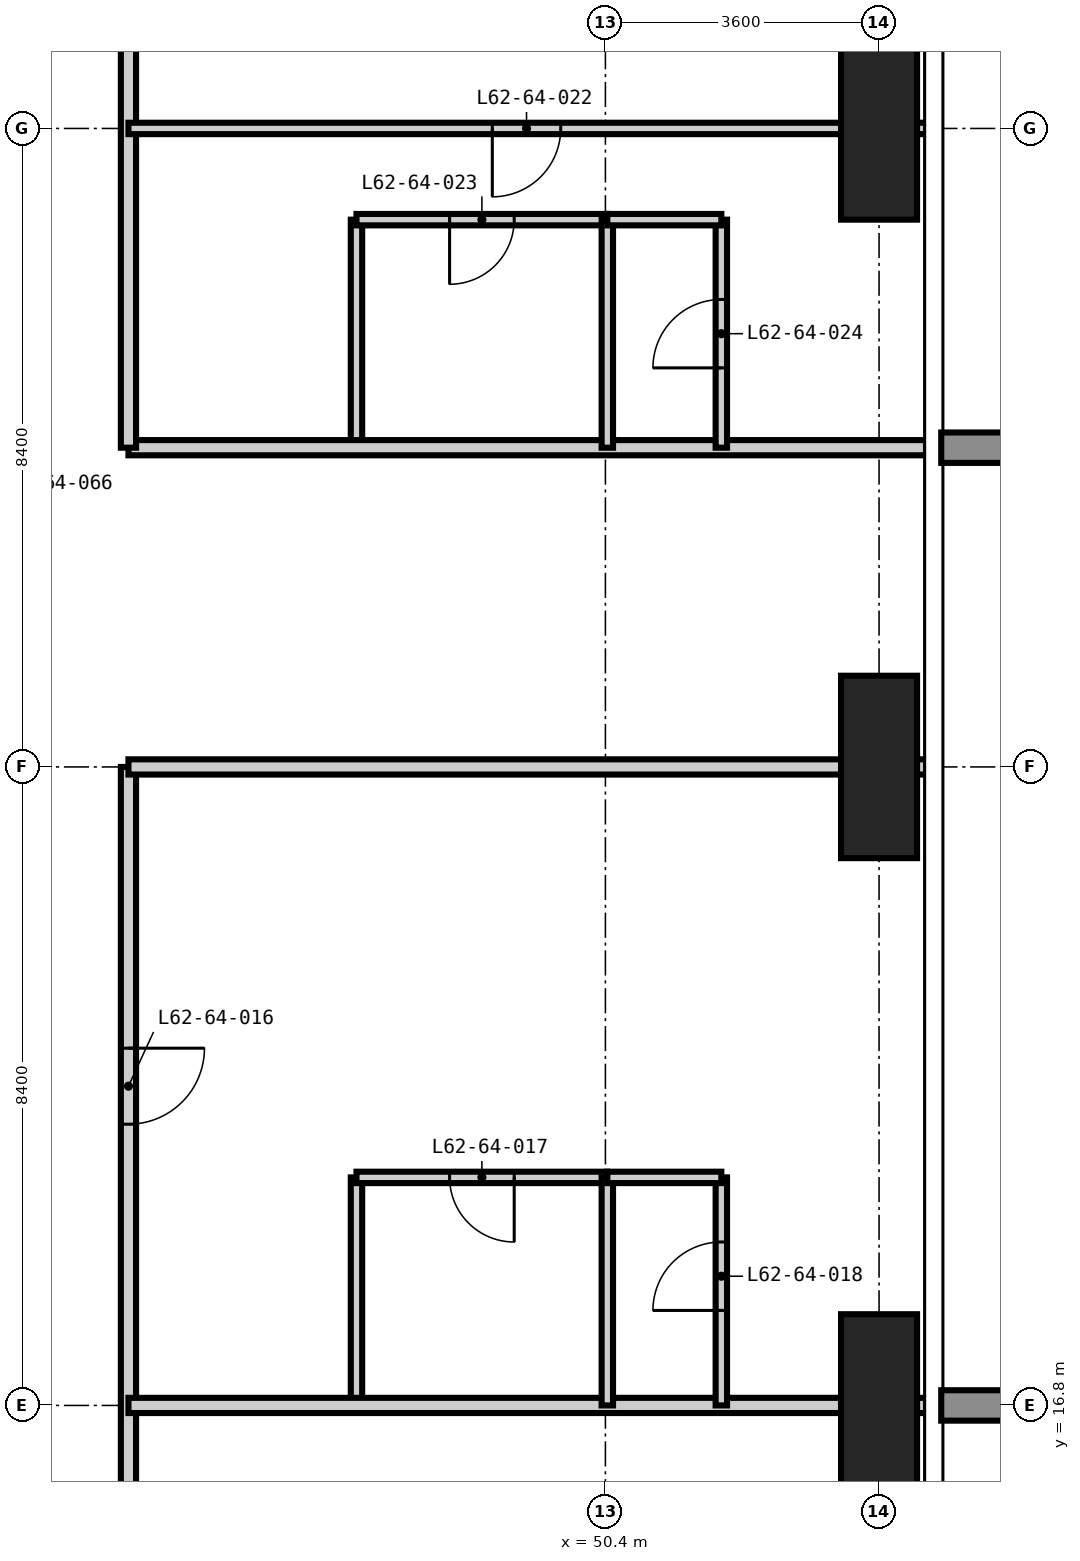
"""IFC4 building model, lengths in metres.
Left out: names, types, materials, properties, quantities, classifications, styles, units other than length and angle.
Written with IfcOpenShell. Run it as: python <this file> out.ifc"""

import sys

from ifc_helpers import new_model, si_unit, direction, frame, frame_2d, origin, origin_2d, place, context, subcontext, project, spatial, rectangle, extrude, element, fill, save


model = new_model("IFC4")
c1 = context("Model", 3, precision=1e-05, world=origin(), true_north=direction((0.0, 1.0)))
c2 = subcontext(c1, "Body", "Model", "MODEL_VIEW")
j1 = project(units=[si_unit("LENGTHUNIT", "METRE"), si_unit("PLANEANGLEUNIT", "RADIAN")], contexts=[c1])
p1 = place(None, origin())
s1 = spatial("IfcSite", under=j1, at=p1, CompositionType="ELEMENT")
p2 = place(p1, origin())
s2 = spatial("IfcBuilding", under=s1, at=p2, CompositionType="ELEMENT")
p3 = place(p2, frame((0.0, 0.0, 241.2)))
s3 = spatial("IfcBuildingStorey", under=s2, at=p3, CompositionType="ELEMENT", Elevation=241.2)
for number, where, z_axis, x_axis in (
    (1, (54.0, 16.8, -0.35), (0.0, 0.0, 1.0), (1.0, 0.0, 0.0)),
    (2, (54.0, 25.2, -0.35), (0.0, 0.0, 1.0), (1.0, 0.0, 0.0)),
    (3, (54.0, 33.6, -0.35), (0.0, 0.0, 1.0), (1.0, 0.0, 0.0)),
):
    element("IfcColumn", number, at=place(p3, frame(where, z_axis=z_axis, x_axis=x_axis)), inside=s3, PredefinedType="COLUMN", context=c2, shape_type="SweptSolid", body=[
        extrude(rectangle(XDim=1.0, YDim=2.4, at=origin_2d()), origin(), (0.0, 0.0, 1.0), 3.9),
    ])
for number, where, z_axis, x_axis in (
    (4, (47.125, 16.8, 0.0), (0.0, 0.0, 1.0), (0.0, 1.0, 0.0)),
    (5, (47.125, 29.4, 0.0), (0.0, 0.0, 1.0), (0.0, 1.0, 0.0)),
):
    element("IfcWall", number, at=place(p3, frame(where, z_axis=z_axis, x_axis=x_axis)), inside=s3, PredefinedType="PARTITIONING", context=c2, shape_type="SweptSolid", body=[
        extrude(rectangle(XDim=3.0, YDim=0.15, at=frame_2d((1.5, 0.0))), origin(), (0.0, 0.0, 1.0), 3.55),
    ])
p4 = place(p3, frame((47.125, 19.8, 0.0), z_axis=(0.0, 0.0, 1.0), x_axis=(1.0, 0.0, 0.0)))
e6 = element("IfcWall", 6, at=p4, inside=s3, PredefinedType="PARTITIONING", context=c2, shape_type="SweptSolid", body=[
    extrude(rectangle(XDim=3.3, YDim=0.15, at=frame_2d((1.65, 0.0))), origin(), (0.0, 0.0, 1.0), 3.55),
])
p5 = place(p4, frame((1.225, 0.0, 0.0)))
e7 = element("IfcOpeningElement", 7, at=p5, cuts=e6, PredefinedType="OPENING", context=c2, shape_type="SweptSolid", body=[
    extrude(rectangle(XDim=0.85, YDim=2.1, at=frame_2d((0.425, 1.05))), frame((0.0, 0.085, 0.0), z_axis=(0.0, -1.0, 0.0), x_axis=(1.0, 0.0, 0.0)), (0.0, 0.0, 1.0), 0.17),
])
p6 = place(p3, frame((47.125, 32.4, 0.0), z_axis=(0.0, 0.0, 1.0), x_axis=(1.0, 0.0, 0.0)))
e8 = element("IfcWall", 8, at=p6, inside=s3, PredefinedType="PARTITIONING", context=c2, shape_type="SweptSolid", body=[
    extrude(rectangle(XDim=3.3, YDim=0.15, at=frame_2d((1.65, 0.0))), origin(), (0.0, 0.0, 1.0), 3.55),
])
p7 = place(p6, frame((1.225, 0.0, 0.0)))
e9 = element("IfcOpeningElement", 9, at=p7, cuts=e8, PredefinedType="OPENING", context=c2, shape_type="SweptSolid", body=[
    extrude(rectangle(XDim=0.85, YDim=2.1, at=frame_2d((0.425, 1.05))), frame((0.0, 0.085, 0.0), z_axis=(0.0, -1.0, 0.0), x_axis=(1.0, 0.0, 0.0)), (0.0, 0.0, 1.0), 0.17),
])
p8 = place(p3, frame((44.125, 29.4, 0.0), z_axis=(0.0, 0.0, 1.0), x_axis=(1.0, 0.0, 0.0)))
e10 = element("IfcWall", 10, at=p8, inside=s3, PredefinedType="PARTITIONING", context=c2, shape_type="SweptSolid", body=[
    extrude(rectangle(XDim=10.493, YDim=0.2, at=frame_2d((5.247, 0.0))), origin(), (0.0, 0.0, 1.0), 3.55),
])
p9 = place(p3, frame((44.125, 25.2, 0.0), z_axis=(0.0, 0.0, 1.0), x_axis=(0.0, -1.0, 0.0)))
e11 = element("IfcWall", 11, at=p9, inside=s3, PredefinedType="PARTITIONING", context=c2, shape_type="SweptSolid", body=[
    extrude(rectangle(XDim=11.725, YDim=0.2, at=frame_2d((5.862, 0.0))), origin(), (0.0, 0.0, 1.0), 3.55),
])
p10 = place(p9, frame((3.7, 0.0, 0.0)))
e12 = element("IfcOpeningElement", 12, at=p10, cuts=e11, PredefinedType="OPENING", context=c2, shape_type="SweptSolid", body=[
    extrude(rectangle(XDim=1.0, YDim=2.2, at=frame_2d((0.5, 1.1))), frame((0.0, 0.11, 0.0), z_axis=(0.0, -1.0, 0.0), x_axis=(1.0, 0.0, 0.0)), (0.0, 0.0, 1.0), 0.22),
])
p11 = place(p9, frame((9.563, 0.0, 0.0)))
e13 = element("IfcOpeningElement", 13, at=p11, cuts=e11, PredefinedType="OPENING", context=c2, shape_type="SweptSolid", body=[
    extrude(rectangle(XDim=1.0, YDim=2.2, at=frame_2d((0.5, 1.1))), frame((0.0, 0.11, 0.0), z_axis=(0.0, -1.0, 0.0), x_axis=(1.0, 0.0, 0.0)), (0.0, 0.0, 1.0), 0.22),
])
p12 = place(p3, frame((44.125, 44.725, 0.0), z_axis=(0.0, 0.0, 1.0), x_axis=(0.0, -1.0, 0.0)))
e14 = element("IfcWall", 14, at=p12, inside=s3, PredefinedType="PARTITIONING", context=c2, shape_type="SweptSolid", body=[
    extrude(rectangle(XDim=15.325, YDim=0.2, at=frame_2d((7.663, 0.0))), origin(), (0.0, 0.0, 1.0), 3.55),
])
p13 = place(p12, frame((5.225, 0.0, 0.0)))
e15 = element("IfcOpeningElement", 15, at=p13, cuts=e14, PredefinedType="OPENING", context=c2, shape_type="SweptSolid", body=[
    extrude(rectangle(XDim=1.0, YDim=2.2, at=frame_2d((0.5, 1.1))), frame((0.0, 0.11, 0.0), z_axis=(0.0, -1.0, 0.0), x_axis=(1.0, 0.0, 0.0)), (0.0, 0.0, 1.0), 0.22),
])
p14 = place(p12, frame((0.863, 0.0, 0.0)))
e16 = element("IfcOpeningElement", 16, at=p14, cuts=e14, PredefinedType="OPENING", context=c2, shape_type="SweptSolid", body=[
    extrude(rectangle(XDim=1.0, YDim=2.2, at=frame_2d((0.5, 1.1))), frame((0.0, 0.11, 0.0), z_axis=(0.0, -1.0, 0.0), x_axis=(1.0, 0.0, 0.0)), (0.0, 0.0, 1.0), 0.22),
])
for number, where, z_axis, x_axis in (
    (17, (54.618, 25.2, 0.0), (0.0, 0.0, 1.0), (-1.0, 0.0, 0.0)),
    (18, (44.125, 16.8, 0.0), (0.0, 0.0, 1.0), (1.0, 0.0, 0.0)),
):
    element("IfcWall", number, at=place(p3, frame(where, z_axis=z_axis, x_axis=x_axis)), inside=s3, PredefinedType="PARTITIONING", context=c2, shape_type="SweptSolid", body=[
        extrude(rectangle(XDim=10.493, YDim=0.2, at=frame_2d((5.247, 0.0))), origin(), (0.0, 0.0, 1.0), 3.55),
    ])
for number, where, z_axis, x_axis in (
    (19, (50.425, 16.8, 0.0), (0.0, 0.0, 1.0), (0.0, 1.0, 0.0)),
    (20, (50.425, 29.4, 0.0), (0.0, 0.0, 1.0), (0.0, 1.0, 0.0)),
):
    element("IfcWall", number, at=place(p3, frame(where, z_axis=z_axis, x_axis=x_axis)), inside=s3, PredefinedType="PARTITIONING", context=c2, shape_type="SweptSolid", body=[
        extrude(rectangle(XDim=3.0, YDim=0.15, at=frame_2d((1.5, 0.0))), origin(), (0.0, 0.0, 1.0), 3.55),
    ])
p15 = place(p3, frame((51.925, 16.8, 0.0), z_axis=(0.0, 0.0, 1.0), x_axis=(0.0, 1.0, 0.0)))
e21 = element("IfcWall", 21, at=p15, inside=s3, PredefinedType="PARTITIONING", context=c2, shape_type="SweptSolid", body=[
    extrude(rectangle(XDim=3.0, YDim=0.15, at=frame_2d((1.5, 0.0))), origin(), (0.0, 0.0, 1.0), 3.55),
])
p16 = place(p15, frame((1.25, 0.0, 0.0)))
e22 = element("IfcOpeningElement", 22, at=p16, cuts=e21, PredefinedType="OPENING", context=c2, shape_type="SweptSolid", body=[
    extrude(rectangle(XDim=0.9, YDim=2.1, at=frame_2d((0.45, 1.05))), frame((0.0, 0.085, 0.0), z_axis=(0.0, -1.0, 0.0), x_axis=(1.0, 0.0, 0.0)), (0.0, 0.0, 1.0), 0.17),
])
p17 = place(p3, frame((51.925, 29.4, 0.0), z_axis=(0.0, 0.0, 1.0), x_axis=(0.0, 1.0, 0.0)))
e23 = element("IfcWall", 23, at=p17, inside=s3, PredefinedType="PARTITIONING", context=c2, shape_type="SweptSolid", body=[
    extrude(rectangle(XDim=3.0, YDim=0.15, at=frame_2d((1.5, 0.0))), origin(), (0.0, 0.0, 1.0), 3.55),
])
p18 = place(p17, frame((1.05, 0.0, 0.0)))
e24 = element("IfcOpeningElement", 24, at=p18, cuts=e23, PredefinedType="OPENING", context=c2, shape_type="SweptSolid", body=[
    extrude(rectangle(XDim=0.9, YDim=2.1, at=frame_2d((0.45, 1.05))), frame((0.0, 0.085, 0.0), z_axis=(0.0, -1.0, 0.0), x_axis=(1.0, 0.0, 0.0)), (0.0, 0.0, 1.0), 0.17),
])
for number, where, z_axis, x_axis in (
    (25, (50.425, 19.8, 0.0), (0.0, 0.0, 1.0), (1.0, 0.0, 0.0)),
    (26, (50.425, 32.4, 0.0), (0.0, 0.0, 1.0), (1.0, 0.0, 0.0)),
):
    element("IfcWall", number, at=place(p3, frame(where, z_axis=z_axis, x_axis=x_axis)), inside=s3, PredefinedType="PARTITIONING", context=c2, shape_type="SweptSolid", body=[
        extrude(rectangle(XDim=1.5, YDim=0.15, at=frame_2d((0.75, 0.0))), origin(), (0.0, 0.0, 1.0), 3.55),
    ])
p19 = place(p3, frame((44.125, 33.6, 0.0), z_axis=(0.0, 0.0, 1.0), x_axis=(1.0, 0.0, 0.0)))
e27 = element("IfcWall", 27, at=p19, inside=s3, PredefinedType="PARTITIONING", context=c2, shape_type="SweptSolid", body=[
    extrude(rectangle(XDim=10.493, YDim=0.15, at=frame_2d((5.247, 0.0))), origin(), (0.0, 0.0, 1.0), 3.55),
])
p20 = place(p19, frame((4.787, 0.0, 0.0)))
e28 = element("IfcOpeningElement", 28, at=p20, cuts=e27, PredefinedType="OPENING", context=c2, shape_type="SweptSolid", body=[
    extrude(rectangle(XDim=0.9, YDim=2.1, at=frame_2d((0.45, 1.05))), frame((0.0, 0.085, 0.0), z_axis=(0.0, -1.0, 0.0), x_axis=(1.0, 0.0, 0.0)), (0.0, 0.0, 1.0), 0.17),
])
p21 = place(p10, origin())
e29 = element("IfcDoor", 29, at=p21, inside=s3, OperationType="SINGLE_SWING_LEFT", PredefinedType="DOOR", context=c2, shape_type="SweptSolid", body=[
    extrude(rectangle(XDim=1.0, YDim=2.2, at=frame_2d((0.5, 1.1))), frame((0.0, 0.025, 0.0), z_axis=(0.0, -1.0, 0.0), x_axis=(1.0, 0.0, 0.0)), (0.0, 0.0, 1.0), 0.05),
])
fill(e12, e29)
p22 = place(p5, frame((0.85, 0.0, 0.0), z_axis=(0.0, 0.0, 1.0), x_axis=(-1.0, 0.0, 0.0)))
e30 = element("IfcDoor", 30, at=p22, inside=s3, OperationType="SINGLE_SWING_LEFT", PredefinedType="DOOR", context=c2, shape_type="SweptSolid", body=[
    extrude(rectangle(XDim=0.85, YDim=2.1, at=frame_2d((0.425, 1.05))), frame((0.0, 0.025, 0.0), z_axis=(0.0, -1.0, 0.0), x_axis=(1.0, 0.0, 0.0)), (0.0, 0.0, 1.0), 0.05),
])
fill(e7, e30)
p23 = place(p16, origin())
e31 = element("IfcDoor", 31, at=p23, inside=s3, OperationType="SINGLE_SWING_LEFT", PredefinedType="DOOR", context=c2, shape_type="SweptSolid", body=[
    extrude(rectangle(XDim=0.9, YDim=2.1, at=frame_2d((0.45, 1.05))), frame((0.0, 0.025, 0.0), z_axis=(0.0, -1.0, 0.0), x_axis=(1.0, 0.0, 0.0)), (0.0, 0.0, 1.0), 0.05),
])
fill(e22, e31)
p24 = place(p20, frame((0.9, 0.0, 0.0), z_axis=(0.0, 0.0, 1.0), x_axis=(-1.0, 0.0, 0.0)))
e32 = element("IfcDoor", 32, at=p24, inside=s3, OperationType="SINGLE_SWING_RIGHT", PredefinedType="DOOR", context=c2, shape_type="SweptSolid", body=[
    extrude(rectangle(XDim=0.9, YDim=2.1, at=frame_2d((0.45, 1.05))), frame((0.0, 0.025, 0.0), z_axis=(0.0, -1.0, 0.0), x_axis=(1.0, 0.0, 0.0)), (0.0, 0.0, 1.0), 0.05),
])
fill(e28, e32)
p25 = place(p7, frame((0.85, 0.0, 0.0), z_axis=(0.0, 0.0, 1.0), x_axis=(-1.0, 0.0, 0.0)))
e33 = element("IfcDoor", 33, at=p25, inside=s3, OperationType="SINGLE_SWING_RIGHT", PredefinedType="DOOR", context=c2, shape_type="SweptSolid", body=[
    extrude(rectangle(XDim=0.85, YDim=2.1, at=frame_2d((0.425, 1.05))), frame((0.0, 0.025, 0.0), z_axis=(0.0, -1.0, 0.0), x_axis=(1.0, 0.0, 0.0)), (0.0, 0.0, 1.0), 0.05),
])
fill(e9, e33)
p26 = place(p18, origin())
e34 = element("IfcDoor", 34, at=p26, inside=s3, OperationType="SINGLE_SWING_LEFT", PredefinedType="DOOR", context=c2, shape_type="SweptSolid", body=[
    extrude(rectangle(XDim=0.9, YDim=2.1, at=frame_2d((0.45, 1.05))), frame((0.0, 0.025, 0.0), z_axis=(0.0, -1.0, 0.0), x_axis=(1.0, 0.0, 0.0)), (0.0, 0.0, 1.0), 0.05),
])
fill(e24, e34)
save(model, sys.argv[1])
